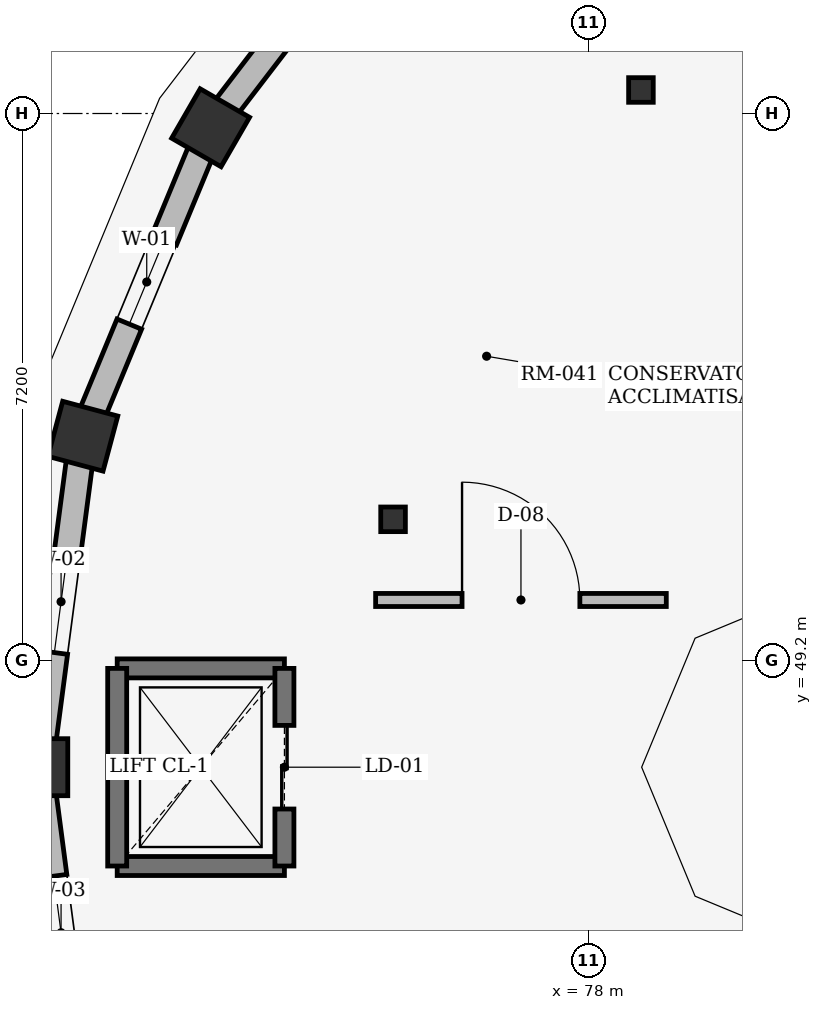
"""IFC4 building model, lengths in metres.
Left out: names, types, materials, properties, quantities, classifications, styles, units other than length and angle.
Written with IfcOpenShell. Run it as: python <this file> out.ifc"""

import sys

from ifc_helpers import new_model, si_unit, direction, frame, frame_2d, origin, origin_2d, place, context, subcontext, project, spatial, rectangle, hollow_circle, extrude, element, fill, save


model = new_model("IFC4")
c1 = context("Model", 3, precision=1e-05, world=origin(), true_north=direction((0.0, 1.0)))
c2 = subcontext(c1, "Body", "Model", "MODEL_VIEW")
j1 = project(units=[si_unit("LENGTHUNIT", "METRE"), si_unit("PLANEANGLEUNIT", "RADIAN")], contexts=[c1])
p1 = place(None, origin())
s1 = spatial("IfcSite", under=j1, at=p1, CompositionType="ELEMENT")
p2 = place(p1, origin())
s2 = spatial("IfcBuilding", under=s1, at=p2, CompositionType="ELEMENT")
p3 = place(p2, origin())
s3 = spatial("IfcBuildingStorey", under=s2, at=p3, CompositionType="ELEMENT", Elevation=0.0)
for number, where, z_axis, x_axis in (
    (1, (73.029, 56.212, 0.0), (0.0, 0.0, 1.0), (-0.866, 0.5, 0.0)),
    (2, (71.348, 52.155, 0.0), (0.0, 0.0, 1.0), (-0.966, 0.259, 0.0)),
    (3, (70.775, 47.8, 0.0), (0.0, 0.0, 1.0), (-1.0, 0.0, 0.0)),
):
    element("IfcColumn", number, at=place(p3, frame(where, z_axis=z_axis, x_axis=x_axis)), inside=s3, PredefinedType="COLUMN", context=c2, shape_type="SweptSolid", body=[
        extrude(rectangle(XDim=0.75, YDim=0.75, at=origin_2d()), origin(), (0.0, 0.0, 1.0), 4.55),
    ])
for number, where, z_axis, x_axis in (
    (4, (78.69, 56.709, 0.0), (0.0, 0.0, 1.0), (1.0, 0.0, 0.0)),
    (5, (75.429, 51.061, 0.0), (0.0, 0.0, 1.0), (1.0, 0.0, 0.0)),
):
    element("IfcColumn", number, at=place(p3, frame(where, z_axis=z_axis, x_axis=x_axis)), inside=s3, PredefinedType="COLUMN", context=c2, shape_type="SweptSolid", body=[
        extrude(hollow_circle(Radius=0.162, WallThickness=0.016, at=origin_2d()), origin(), (0.0, 0.0, 1.0), 4.55),
    ])
p4 = place(p3, frame((75.703, 59.697, 0.0), z_axis=(0.0, 0.0, 1.0), x_axis=(-0.608759396381, -0.793354899977, 0.0)))
e6 = element("IfcWall", 6, at=p4, inside=s3, PredefinedType="STANDARD", context=c2, shape_type="SweptSolid", body=[
    extrude(rectangle(XDim=4.392, YDim=0.35, at=frame_2d((2.196, 0.0))), origin(), (0.0, 0.0, 1.0), 4.55),
])
p5 = place(p4, frame((1.596, 0.0, 1.1)))
e7 = element("IfcOpeningElement", 7, at=p5, cuts=e6, PredefinedType="OPENING", context=c2, shape_type="SweptSolid", body=[
    extrude(rectangle(XDim=1.2, YDim=2.1, at=frame_2d((0.6, 1.05))), frame((0.0, 0.185, 0.0), z_axis=(0.0, -1.0, 0.0), x_axis=(1.0, 0.0, 0.0)), (0.0, 0.0, 1.0), 0.37),
])
p6 = place(p3, frame((73.029, 56.212, 0.0), z_axis=(0.0, 0.0, 1.0), x_axis=(-0.382652895287, -0.923892180792, 0.0)))
e8 = element("IfcWall", 8, at=p6, inside=s3, PredefinedType="STANDARD", context=c2, shape_type="SweptSolid", body=[
    extrude(rectangle(XDim=4.392, YDim=0.35, at=frame_2d((2.196, 0.0))), origin(), (0.0, 0.0, 1.0), 4.55),
])
p7 = place(p6, frame((1.596, 0.0, 1.1)))
e9 = element("IfcOpeningElement", 9, at=p7, cuts=e8, PredefinedType="OPENING", context=c2, shape_type="SweptSolid", body=[
    extrude(rectangle(XDim=1.2, YDim=1.8, at=frame_2d((0.6, 0.9))), frame((0.0, 0.185, 0.0), z_axis=(0.0, -1.0, 0.0), x_axis=(1.0, 0.0, 0.0)), (0.0, 0.0, 1.0), 0.37),
])
p8 = place(p3, frame((71.348, 52.155, 0.0), z_axis=(0.0, 0.0, 1.0), x_axis=(-0.130572419871, -0.991438774292, 0.0)))
e10 = element("IfcWall", 10, at=p8, inside=s3, PredefinedType="STANDARD", context=c2, shape_type="SweptSolid", body=[
    extrude(rectangle(XDim=4.392, YDim=0.35, at=frame_2d((2.196, 0.0))), origin(), (0.0, 0.0, 1.0), 4.55),
])
p9 = place(p8, frame((1.521, 0.0, 1.1)))
e11 = element("IfcOpeningElement", 11, at=p9, cuts=e10, PredefinedType="OPENING", context=c2, shape_type="SweptSolid", body=[
    extrude(rectangle(XDim=1.35, YDim=1.8, at=frame_2d((0.675, 0.9))), frame((0.0, 0.185, 0.0), z_axis=(0.0, -1.0, 0.0), x_axis=(1.0, 0.0, 0.0)), (0.0, 0.0, 1.0), 0.37),
])
p10 = place(p3, frame((70.775, 47.8, 0.0), z_axis=(0.0, 0.0, 1.0), x_axis=(0.130565224353, -0.991439721914, 0.0)))
e12 = element("IfcWall", 12, at=p10, inside=s3, PredefinedType="STANDARD", context=c2, shape_type="SweptSolid", body=[
    extrude(rectangle(XDim=4.392, YDim=0.35, at=frame_2d((2.196, 0.0))), origin(), (0.0, 0.0, 1.0), 4.55),
])
p11 = place(p10, frame((1.446, 0.0, 1.1)))
e13 = element("IfcOpeningElement", 13, at=p11, cuts=e12, PredefinedType="OPENING", context=c2, shape_type="SweptSolid", body=[
    extrude(rectangle(XDim=1.5, YDim=1.8, at=frame_2d((0.75, 0.9))), frame((0.0, 0.185, 0.0), z_axis=(0.0, -1.0, 0.0), x_axis=(1.0, 0.0, 0.0)), (0.0, 0.0, 1.0), 0.37),
])
for number, where, z_axis, x_axis in (
    (14, (71.8, 46.5, 0.0), (0.0, 0.0, 1.0), (1.0, 0.0, 0.0)),
    (15, (71.8, 49.1, 0.0), (0.0, 0.0, 1.0), (1.0, 0.0, 0.0)),
):
    element("IfcWall", number, at=place(p3, frame(where, z_axis=z_axis, x_axis=x_axis)), inside=s3, PredefinedType="SHEAR", context=c2, shape_type="SweptSolid", body=[
        extrude(rectangle(XDim=2.2, YDim=0.25, at=frame_2d((1.1, 0.0))), origin(), (0.0, 0.0, 1.0), 4.48),
    ])
p12 = place(p3, frame((71.8, 46.5, 0.0), z_axis=(0.0, 0.0, 1.0), x_axis=(0.0, 1.0, 0.0)))
e16 = element("IfcWall", 16, at=p12, inside=s3, PredefinedType="SHEAR", context=c2, shape_type="SweptSolid", body=[
    extrude(rectangle(XDim=2.6, YDim=0.25, at=frame_2d((1.3, 0.0))), origin(), (0.0, 0.0, 1.0), 4.48),
])
p13 = place(p3, frame((74.0, 46.5, 0.0), z_axis=(0.0, 0.0, 1.0), x_axis=(0.0, 1.0, 0.0)))
e17 = element("IfcWall", 17, at=p13, inside=s3, PredefinedType="SHEAR", context=c2, shape_type="SweptSolid", body=[
    extrude(rectangle(XDim=2.6, YDim=0.25, at=frame_2d((1.3, 0.0))), origin(), (0.0, 0.0, 1.0), 4.48),
])
p14 = place(p13, frame((0.75, 0.0, 0.0)))
e18 = element("IfcOpeningElement", 18, at=p14, cuts=e17, PredefinedType="OPENING", context=c2, shape_type="SweptSolid", body=[
    extrude(rectangle(XDim=1.1, YDim=2.2, at=frame_2d((0.55, 1.1))), frame((0.0, 0.135, 0.0), z_axis=(0.0, -1.0, 0.0), x_axis=(1.0, 0.0, 0.0)), (0.0, 0.0, 1.0), 0.27),
])
p15 = place(p3, frame((75.2, 50.0, 0.0), z_axis=(0.0, 0.0, 1.0), x_axis=(1.0, 0.0, 0.0)))
e19 = element("IfcWall", 19, at=p15, inside=s3, PredefinedType="PARTITIONING", context=c2, shape_type="SweptSolid", body=[
    extrude(rectangle(XDim=3.824, YDim=0.172, at=frame_2d((1.912, 0.0))), origin(), (0.0, 0.0, 1.0), 4.45),
])
p16 = place(p15, frame((1.137, 0.0, 0.0)))
e20 = element("IfcOpeningElement", 20, at=p16, cuts=e19, PredefinedType="OPENING", context=c2, shape_type="SweptSolid", body=[
    extrude(rectangle(XDim=1.55, YDim=2.25, at=frame_2d((0.775, 1.125))), frame((0.0, 0.096, 0.0), z_axis=(0.0, -1.0, 0.0), x_axis=(1.0, 0.0, 0.0)), (0.0, 0.0, 1.0), 0.192),
])
p17 = place(p7, origin())
e21 = element("IfcWindow", 21, at=p17, inside=s3, PartitioningType="SINGLE_PANEL", PredefinedType="WINDOW", context=c2, shape_type="SweptSolid", body=[
    extrude(rectangle(XDim=1.2, YDim=1.8, at=frame_2d((0.6, 0.9))), frame((0.0, 0.03, 0.0), z_axis=(0.0, -1.0, 0.0), x_axis=(1.0, 0.0, 0.0)), (0.0, 0.0, 1.0), 0.06),
])
fill(e9, e21)
p18 = place(p9, origin())
e22 = element("IfcWindow", 22, at=p18, inside=s3, PartitioningType="SINGLE_PANEL", PredefinedType="WINDOW", context=c2, shape_type="SweptSolid", body=[
    extrude(rectangle(XDim=1.35, YDim=1.8, at=frame_2d((0.675, 0.9))), frame((0.0, 0.03, 0.0), z_axis=(0.0, -1.0, 0.0), x_axis=(1.0, 0.0, 0.0)), (0.0, 0.0, 1.0), 0.06),
])
fill(e11, e22)
p19 = place(p11, origin())
e23 = element("IfcWindow", 23, at=p19, inside=s3, PartitioningType="SINGLE_PANEL", PredefinedType="WINDOW", context=c2, shape_type="SweptSolid", body=[
    extrude(rectangle(XDim=1.5, YDim=1.8, at=frame_2d((0.75, 0.9))), frame((0.0, 0.03, 0.0), z_axis=(0.0, -1.0, 0.0), x_axis=(1.0, 0.0, 0.0)), (0.0, 0.0, 1.0), 0.06),
])
fill(e13, e23)
p20 = place(p14, origin())
e24 = element("IfcDoor", 24, at=p20, inside=s3, OperationType="DOUBLE_DOOR_SLIDING", PredefinedType="DOOR", context=c2, shape_type="SweptSolid", body=[
    extrude(rectangle(XDim=1.1, YDim=2.2, at=frame_2d((0.55, 1.1))), frame((0.0, 0.025, 0.0), z_axis=(0.0, -1.0, 0.0), x_axis=(1.0, 0.0, 0.0)), (0.0, 0.0, 1.0), 0.05),
])
fill(e18, e24)
p21 = place(p16, origin())
e25 = element("IfcDoor", 25, at=p21, inside=s3, OperationType="DOUBLE_DOOR_SINGLE_SWING", PredefinedType="DOOR", context=c2, shape_type="SweptSolid", body=[
    extrude(rectangle(XDim=1.55, YDim=2.25, at=frame_2d((0.775, 1.125))), frame((0.0, 0.025, 0.0), z_axis=(0.0, -1.0, 0.0), x_axis=(1.0, 0.0, 0.0)), (0.0, 0.0, 1.0), 0.05),
])
fill(e20, e25)
save(model, sys.argv[1])
